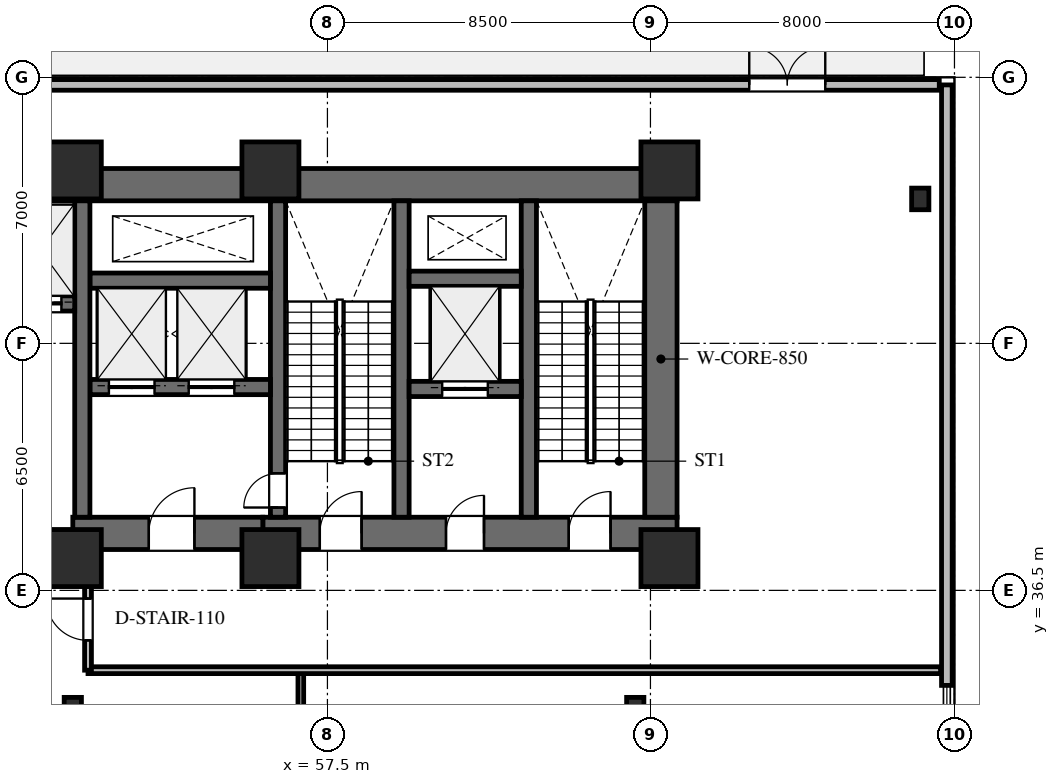
"""IFC4 building model, lengths in metres.
Left out: names, types, materials, properties, quantities, classifications, styles, units other than length and angle.
Written with IfcOpenShell. Run it as: python <this file> out.ifc"""

import sys

from ifc_helpers import new_model, si_unit, direction, frame, frame_2d, origin, origin_2d, place, context, subcontext, project, spatial, rectangle, i_section, extrude, element, fill, save


model = new_model("IFC4")
c1 = context("Model", 3, precision=1e-05, world=origin(), true_north=direction((0.0, 1.0)))
c2 = subcontext(c1, "Body", "Model", "MODEL_VIEW")
j1 = project(units=[si_unit("LENGTHUNIT", "METRE"), si_unit("PLANEANGLEUNIT", "RADIAN")], contexts=[c1])
p1 = place(None, origin())
s1 = spatial("IfcSite", under=j1, at=p1, CompositionType="ELEMENT")
p2 = place(p1, origin())
s2 = spatial("IfcBuilding", under=s1, at=p2, CompositionType="ELEMENT")
p3 = place(p2, origin())
s3 = spatial("IfcBuildingStorey", under=s2, at=p3, CompositionType="ELEMENT", Elevation=0.0)
p4 = place(p3, frame((22.9, 47.175, 0.0), z_axis=(0.0, 0.0, 1.0), x_axis=(1.0, 0.0, 0.0)))
e1 = element("IfcWall", 1, at=p4, inside=s3, PredefinedType="SHEAR", context=c2, shape_type="SweptSolid", body=[
    extrude(rectangle(XDim=43.8, YDim=0.85, at=frame_2d((21.9, 0.0))), origin(), (0.0, 0.0, 1.0), 5.4),
])
p5 = place(p3, frame((55.8, 38.0, 0.0), z_axis=(0.0, 0.0, 1.0), x_axis=(1.0, 0.0, 0.0)))
e2 = element("IfcWall", 2, at=p5, inside=s3, PredefinedType="SHEAR", context=c2, shape_type="SweptSolid", body=[
    extrude(rectangle(XDim=10.9, YDim=0.85, at=frame_2d((5.45, 0.0))), origin(), (0.0, 0.0, 1.0), 5.4),
])
p6 = place(p5, frame((1.5, 0.0, 0.0)))
e3 = element("IfcOpeningElement", 3, at=p6, cuts=e2, PredefinedType="OPENING", context=c2, shape_type="SweptSolid", body=[
    extrude(rectangle(XDim=1.1, YDim=2.2, at=frame_2d((0.55, 1.1))), frame((0.0, 0.435, 0.0), z_axis=(0.0, -1.0, 0.0), x_axis=(1.0, 0.0, 0.0)), (0.0, 0.0, 1.0), 0.87),
])
p7 = place(p5, frame((4.82, 0.0, 0.0)))
e4 = element("IfcOpeningElement", 4, at=p7, cuts=e2, PredefinedType="OPENING", context=c2, shape_type="SweptSolid", body=[
    extrude(rectangle(XDim=1.0, YDim=2.15, at=frame_2d((0.5, 1.075))), frame((0.0, 0.435, 0.0), z_axis=(0.0, -1.0, 0.0), x_axis=(1.0, 0.0, 0.0)), (0.0, 0.0, 1.0), 0.87),
])
p8 = place(p5, frame((8.05, 0.0, 0.0)))
e5 = element("IfcOpeningElement", 5, at=p8, cuts=e2, PredefinedType="OPENING", context=c2, shape_type="SweptSolid", body=[
    extrude(rectangle(XDim=1.1, YDim=2.2, at=frame_2d((0.55, 1.1))), frame((0.0, 0.435, 0.0), z_axis=(0.0, -1.0, 0.0), x_axis=(1.0, 0.0, 0.0)), (0.0, 0.0, 1.0), 0.87),
])
p9 = place(p3, frame((66.275, 38.425, 0.0), z_axis=(0.0, 0.0, 1.0), x_axis=(0.0, 1.0, 0.0)))
e6 = element("IfcWall", 6, at=p9, inside=s3, PredefinedType="SHEAR", context=c2, shape_type="SweptSolid", body=[
    extrude(rectangle(XDim=8.325, YDim=0.85, at=frame_2d((4.163, 0.0))), origin(), (0.0, 0.0, 1.0), 5.4),
])
for number, where, z_axis, x_axis in (
    (7, (62.8, 38.425, 0.0), (0.0, 0.0, 1.0), (0.0, 1.0, 0.0)),
    (8, (59.45, 38.425, 0.0), (0.0, 0.0, 1.0), (0.0, 1.0, 0.0)),
):
    element("IfcWall", number, at=place(p3, frame(where, z_axis=z_axis, x_axis=x_axis)), inside=s3, PredefinedType="SHEAR", context=c2, shape_type="SweptSolid", body=[
        extrude(rectangle(XDim=8.325, YDim=0.4, at=frame_2d((4.163, 0.0))), origin(), (0.0, 0.0, 1.0), 5.4),
    ])
p10 = place(p3, frame((56.2, 38.425, 0.0), z_axis=(0.0, 0.0, 1.0), x_axis=(0.0, 1.0, 0.0)))
e9 = element("IfcWall", 9, at=p10, inside=s3, PredefinedType="SHEAR", context=c2, shape_type="SweptSolid", body=[
    extrude(rectangle(XDim=8.325, YDim=0.4, at=frame_2d((4.163, 0.0))), origin(), (0.0, 0.0, 1.0), 5.4),
])
p11 = place(p10, frame((0.255, 0.0, 0.0)))
e10 = element("IfcOpeningElement", 10, at=p11, cuts=e9, PredefinedType="OPENING", context=c2, shape_type="SweptSolid", body=[
    extrude(rectangle(XDim=0.9, YDim=2.15, at=frame_2d((0.45, 1.075))), frame((0.0, 0.21, 0.0), z_axis=(0.0, -1.0, 0.0), x_axis=(1.0, 0.0, 0.0)), (0.0, 0.0, 1.0), 0.42),
])
p12 = place(p3, frame((59.65, 41.8, 0.0), z_axis=(0.0, 0.0, 1.0), x_axis=(1.0, 0.0, 0.0)))
e11 = element("IfcWall", 11, at=p12, inside=s3, PredefinedType="SHEAR", context=c2, shape_type="SweptSolid", body=[
    extrude(rectangle(XDim=2.95, YDim=0.4, at=frame_2d((1.475, 0.0))), origin(), (0.0, 0.0, 1.0), 5.4),
])
p13 = place(p12, frame((0.87, 0.0, 0.0)))
e12 = element("IfcOpeningElement", 12, at=p13, cuts=e11, PredefinedType="OPENING", context=c2, shape_type="SweptSolid", body=[
    extrude(rectangle(XDim=1.2, YDim=2.2, at=frame_2d((0.6, 1.1))), frame((0.0, 0.21, 0.0), z_axis=(0.0, -1.0, 0.0), x_axis=(1.0, 0.0, 0.0)), (0.0, 0.0, 1.0), 0.42),
])
p14 = place(p3, frame((59.65, 44.7, 0.0), z_axis=(0.0, 0.0, 1.0), x_axis=(1.0, 0.0, 0.0)))
e13 = element("IfcWall", 13, at=p14, inside=s3, PredefinedType="SHEAR", context=c2, shape_type="SweptSolid", body=[
    extrude(rectangle(XDim=2.95, YDim=0.4, at=frame_2d((1.475, 0.0))), origin(), (0.0, 0.0, 1.0), 5.4),
])
p15 = place(p3, frame((50.8, 38.0, 0.0), z_axis=(0.0, 0.0, 1.0), x_axis=(1.0, 0.0, 0.0)))
e14 = element("IfcWall", 14, at=p15, inside=s3, PredefinedType="SHEAR", context=c2, shape_type="SweptSolid", body=[
    extrude(rectangle(XDim=5.0, YDim=0.85, at=frame_2d((2.5, 0.0))), origin(), (0.0, 0.0, 1.0), 5.4),
])
p16 = place(p15, frame((2.0, 0.0, 0.0)))
e15 = element("IfcOpeningElement", 15, at=p16, cuts=e14, PredefinedType="OPENING", context=c2, shape_type="SweptSolid", body=[
    extrude(rectangle(XDim=1.2, YDim=2.2, at=frame_2d((0.6, 1.1))), frame((0.0, 0.435, 0.0), z_axis=(0.0, -1.0, 0.0), x_axis=(1.0, 0.0, 0.0)), (0.0, 0.0, 1.0), 0.87),
])
p17 = place(p3, frame((51.25, 41.85, 0.0), z_axis=(0.0, 0.0, 1.0), x_axis=(1.0, 0.0, 0.0)))
e16 = element("IfcWall", 16, at=p17, inside=s3, PredefinedType="SHEAR", context=c2, shape_type="SweptSolid", body=[
    extrude(rectangle(XDim=4.75, YDim=0.4, at=frame_2d((2.375, 0.0))), origin(), (0.0, 0.0, 1.0), 5.4),
])
p18 = place(p17, frame((0.5, 0.0, 0.0)))
e17 = element("IfcOpeningElement", 17, at=p18, cuts=e16, PredefinedType="OPENING", context=c2, shape_type="SweptSolid", body=[
    extrude(rectangle(XDim=1.2, YDim=2.2, at=frame_2d((0.6, 1.1))), frame((0.0, 0.21, 0.0), z_axis=(0.0, -1.0, 0.0), x_axis=(1.0, 0.0, 0.0)), (0.0, 0.0, 1.0), 0.42),
])
p19 = place(p17, frame((2.6, 0.0, 0.0)))
e18 = element("IfcOpeningElement", 18, at=p19, cuts=e16, PredefinedType="OPENING", context=c2, shape_type="SweptSolid", body=[
    extrude(rectangle(XDim=1.2, YDim=2.2, at=frame_2d((0.6, 1.1))), frame((0.0, 0.21, 0.0), z_axis=(0.0, -1.0, 0.0), x_axis=(1.0, 0.0, 0.0)), (0.0, 0.0, 1.0), 0.42),
])
p20 = place(p3, frame((51.25, 44.65, 0.0), z_axis=(0.0, 0.0, 1.0), x_axis=(1.0, 0.0, 0.0)))
e19 = element("IfcWall", 19, at=p20, inside=s3, PredefinedType="SHEAR", context=c2, shape_type="SweptSolid", body=[
    extrude(rectangle(XDim=4.75, YDim=0.4, at=frame_2d((2.375, 0.0))), origin(), (0.0, 0.0, 1.0), 5.4),
])
p21 = place(p3, frame((51.05, 38.425, 0.0), z_axis=(0.0, 0.0, 1.0), x_axis=(0.0, 1.0, 0.0)))
e20 = element("IfcWall", 20, at=p21, inside=s3, PredefinedType="SHEAR", context=c2, shape_type="SweptSolid", body=[
    extrude(rectangle(XDim=8.325, YDim=0.4, at=frame_2d((4.163, 0.0))), origin(), (0.0, 0.0, 1.0), 5.4),
])
p22 = place(p3, frame((45.25, 44.05, 0.0), z_axis=(0.0, 0.0, 1.0), x_axis=(1.0, 0.0, 0.0)))
e21 = element("IfcWall", 21, at=p22, inside=s3, PredefinedType="SHEAR", context=c2, shape_type="SweptSolid", body=[
    extrude(rectangle(XDim=5.6, YDim=0.4, at=frame_2d((2.8, 0.0))), origin(), (0.0, 0.0, 1.0), 5.4),
])
p23 = place(p22, frame((0.35, 0.0, 0.0)))
e22 = element("IfcOpeningElement", 22, at=p23, cuts=e21, PredefinedType="OPENING", context=c2, shape_type="SweptSolid", body=[
    extrude(rectangle(XDim=1.1, YDim=2.2, at=frame_2d((0.55, 1.1))), frame((0.0, 0.21, 0.0), z_axis=(0.0, -1.0, 0.0), x_axis=(1.0, 0.0, 0.0)), (0.0, 0.0, 1.0), 0.42),
])
p24 = place(p22, frame((2.25, 0.0, 0.0)))
e23 = element("IfcOpeningElement", 23, at=p24, cuts=e21, PredefinedType="OPENING", context=c2, shape_type="SweptSolid", body=[
    extrude(rectangle(XDim=1.1, YDim=2.2, at=frame_2d((0.55, 1.1))), frame((0.0, 0.21, 0.0), z_axis=(0.0, -1.0, 0.0), x_axis=(1.0, 0.0, 0.0)), (0.0, 0.0, 1.0), 0.42),
])
p25 = place(p22, frame((4.15, 0.0, 0.0)))
e24 = element("IfcOpeningElement", 24, at=p25, cuts=e21, PredefinedType="OPENING", context=c2, shape_type="SweptSolid", body=[
    extrude(rectangle(XDim=1.1, YDim=2.2, at=frame_2d((0.55, 1.1))), frame((0.0, 0.21, 0.0), z_axis=(0.0, -1.0, 0.0), x_axis=(1.0, 0.0, 0.0)), (0.0, 0.0, 1.0), 0.42),
])
for number, where, z_axis, x_axis in (
    (25, (73.1, 46.8, 0.0), (0.0, 0.0, 1.0), (1.0, 0.0, 0.0)),
    (26, (50.8, 33.4, 0.0), (0.0, 0.0, 1.0), (1.0, 0.0, 0.0)),
    (27, (65.6, 33.4, 0.0), (0.0, 0.0, 1.0), (1.0, 0.0, 0.0)),
):
    element("IfcColumn", number, at=place(p3, frame(where, z_axis=z_axis, x_axis=x_axis)), inside=s3, PredefinedType="COLUMN", context=c2, shape_type="SweptSolid", body=[
        extrude(i_section(OverallWidth=0.454, OverallDepth=0.569, WebThickness=0.078, FlangeThickness=0.125, FilletRadius=0.03, at=origin_2d()), origin(), (0.0, 0.0, 1.0), 5.4),
    ])
for number, where, z_axis, x_axis in (
    (28, (66.5, 47.55, 0.0), (0.0, 0.0, 1.0), (1.0, 0.0, 0.0)),
    (29, (56.0, 47.55, 0.0), (0.0, 0.0, 1.0), (1.0, 0.0, 0.0)),
    (30, (66.5, 37.35, 0.0), (0.0, 0.0, 1.0), (1.0, 0.0, 0.0)),
    (31, (56.0, 37.35, 0.0), (0.0, 0.0, 1.0), (1.0, 0.0, 0.0)),
    (32, (50.8, 47.55, 0.0), (0.0, 0.0, 1.0), (1.0, 0.0, 0.0)),
    (33, (50.8, 37.35, 0.0), (0.0, 0.0, 1.0), (1.0, 0.0, 0.0)),
):
    element("IfcColumn", number, at=place(p3, frame(where, z_axis=z_axis, x_axis=x_axis)), inside=s3, PredefinedType="COLUMN", context=c2, shape_type="SweptSolid", body=[
        extrude(rectangle(XDim=1.5, YDim=1.5, at=origin_2d()), origin(), (0.0, 0.0, 1.0), 5.4),
    ])
p26 = place(p3, frame((0.4, 49.8, 0.0), z_axis=(0.0, 0.0, 1.0), x_axis=(1.0, 0.0, 0.0)))
e34 = element("IfcWall", 34, at=p26, inside=s3, PredefinedType="STANDARD", context=c2, shape_type="SweptSolid", body=[
    extrude(rectangle(XDim=73.2, YDim=0.28, at=frame_2d((36.6, 0.0))), origin(), (0.0, 0.0, 1.0), 5.13),
])
p27 = place(p26, frame((20.1, 0.0, 0.0)))
e35 = element("IfcOpeningElement", 35, at=p27, cuts=e34, PredefinedType="OPENING", context=c2, shape_type="SweptSolid", body=[
    extrude(rectangle(XDim=2.0, YDim=2.4, at=frame_2d((1.0, 1.2))), frame((0.0, 0.15, 0.0), z_axis=(0.0, -1.0, 0.0), x_axis=(1.0, 0.0, 0.0)), (0.0, 0.0, 1.0), 0.3),
])
p28 = place(p26, frame((68.2, 0.0, 0.0)))
e36 = element("IfcOpeningElement", 36, at=p28, cuts=e34, PredefinedType="OPENING", context=c2, shape_type="SweptSolid", body=[
    extrude(rectangle(XDim=2.0, YDim=2.4, at=frame_2d((1.0, 1.2))), frame((0.0, 0.15, 0.0), z_axis=(0.0, -1.0, 0.0), x_axis=(1.0, 0.0, 0.0)), (0.0, 0.0, 1.0), 0.3),
])
p29 = place(p26, frame((3.5, 0.0, 0.0)))
e37 = element("IfcOpeningElement", 37, at=p29, cuts=e34, PredefinedType="OPENING", context=c2, shape_type="SweptSolid", body=[
    extrude(rectangle(XDim=2.4, YDim=2.4, at=frame_2d((1.2, 1.2))), frame((0.0, 0.15, 0.0), z_axis=(0.0, -1.0, 0.0), x_axis=(1.0, 0.0, 0.0)), (0.0, 0.0, 1.0), 0.3),
])
p30 = place(p3, frame((73.8, 34.0, 0.0), z_axis=(0.0, 0.0, 1.0), x_axis=(0.0, 1.0, 0.0)))
e38 = element("IfcWall", 38, at=p30, inside=s3, PredefinedType="STANDARD", context=c2, shape_type="SweptSolid", body=[
    extrude(rectangle(XDim=15.8, YDim=0.28, at=frame_2d((7.9, 0.0))), origin(), (0.0, 0.0, 1.0), 5.13),
])
p31 = place(p3, frame((45.05, 38.0, 0.0), z_axis=(0.0, 0.0, 1.0), x_axis=(1.0, 0.0, 0.0)))
e39 = element("IfcWall", 39, at=p31, inside=s3, PredefinedType="STANDARD", context=c2, shape_type="SweptSolid", body=[
    extrude(rectangle(XDim=5.75, YDim=0.18, at=frame_2d((2.875, 0.0))), origin(), (0.0, 0.0, 1.0), 4.182),
])
p32 = place(p31, frame((1.908, 0.0, 0.0)))
e40 = element("IfcOpeningElement", 40, at=p32, cuts=e39, PredefinedType="OPENING", context=c2, shape_type="SweptSolid", body=[
    extrude(rectangle(XDim=1.8, YDim=2.2, at=frame_2d((0.9, 1.1))), frame((0.0, 0.1, 0.0), z_axis=(0.0, -1.0, 0.0), x_axis=(1.0, 0.0, 0.0)), (0.0, 0.0, 1.0), 0.2),
])
p33 = place(p3, frame((56.8, 0.365, 0.0), z_axis=(0.0, 0.0, 1.0), x_axis=(0.0, 1.0, 0.0)))
e41 = element("IfcWall", 41, at=p33, inside=s3, PredefinedType="PARTITIONING", context=c2, shape_type="SweptSolid", body=[
    extrude(rectangle(XDim=33.967, YDim=0.15, at=frame_2d((16.983, 0.0))), origin(), (0.0, 0.0, 1.0), 4.182),
])
p34 = place(p33, frame((8.435, 0.0, 0.0)))
e42 = element("IfcOpeningElement", 42, at=p34, cuts=e41, PredefinedType="OPENING", context=c2, shape_type="SweptSolid", body=[
    extrude(rectangle(XDim=1.1, YDim=2.2, at=frame_2d((0.55, 1.1))), frame((0.0, 0.085, 0.0), z_axis=(0.0, -1.0, 0.0), x_axis=(1.0, 0.0, 0.0)), (0.0, 0.0, 1.0), 0.17),
])
p35 = place(p33, frame((19.485, 0.0, 0.0)))
e43 = element("IfcOpeningElement", 43, at=p35, cuts=e41, PredefinedType="OPENING", context=c2, shape_type="SweptSolid", body=[
    extrude(rectangle(XDim=1.8, YDim=2.2, at=frame_2d((0.9, 1.1))), frame((0.0, 0.085, 0.0), z_axis=(0.0, -1.0, 0.0), x_axis=(1.0, 0.0, 0.0)), (0.0, 0.0, 1.0), 0.17),
])
p36 = place(p33, frame((29.516, 0.0, 0.0)))
e44 = element("IfcOpeningElement", 44, at=p36, cuts=e41, PredefinedType="OPENING", context=c2, shape_type="SweptSolid", body=[
    extrude(rectangle(XDim=1.05, YDim=2.2, at=frame_2d((0.525, 1.1))), frame((0.0, 0.085, 0.0), z_axis=(0.0, -1.0, 0.0), x_axis=(1.0, 0.0, 0.0)), (0.0, 0.0, 1.0), 0.17),
])
p37 = place(p3, frame((51.2, 34.4, 0.0), z_axis=(0.0, 0.0, 1.0), x_axis=(1.0, 0.0, 0.0)))
e45 = element("IfcWall", 45, at=p37, inside=s3, PredefinedType="STANDARD", context=c2, shape_type="SweptSolid", body=[
    extrude(rectangle(XDim=22.435, YDim=0.18, at=frame_2d((11.218, 0.0))), origin(), (0.0, 0.0, 1.0), 4.182),
])
p38 = place(p3, frame((51.2, 34.4, 0.0), z_axis=(0.0, 0.0, 1.0), x_axis=(0.0, 1.0, 0.0)))
e46 = element("IfcWall", 46, at=p38, inside=s3, PredefinedType="STANDARD", context=c2, shape_type="SweptSolid", body=[
    extrude(rectangle(XDim=3.167, YDim=0.18, at=frame_2d((1.583, 0.0))), origin(), (0.0, 0.0, 1.0), 4.823),
])
p39 = place(p38, frame((0.785, 0.0, 0.0)))
e47 = element("IfcOpeningElement", 47, at=p39, cuts=e46, PredefinedType="OPENING", context=c2, shape_type="SweptSolid", body=[
    extrude(rectangle(XDim=1.1, YDim=2.2, at=frame_2d((0.55, 1.1))), frame((0.0, 0.1, 0.0), z_axis=(0.0, -1.0, 0.0), x_axis=(1.0, 0.0, 0.0)), (0.0, 0.0, 1.0), 0.2),
])
p40 = place(p28, origin())
e48 = element("IfcDoor", 48, at=p40, inside=s3, OperationType="DOUBLE_DOOR_SINGLE_SWING", PredefinedType="DOOR", context=c2, shape_type="SweptSolid", body=[
    extrude(rectangle(XDim=2.0, YDim=2.4, at=frame_2d((1.0, 1.2))), frame((0.0, 0.025, 0.0), z_axis=(0.0, -1.0, 0.0), x_axis=(1.0, 0.0, 0.0)), (0.0, 0.0, 1.0), 0.05),
])
fill(e36, e48)
p41 = place(p6, origin())
e49 = element("IfcDoor", 49, at=p41, inside=s3, OperationType="SINGLE_SWING_RIGHT", PredefinedType="DOOR", context=c2, shape_type="SweptSolid", body=[
    extrude(rectangle(XDim=1.1, YDim=2.2, at=frame_2d((0.55, 1.1))), frame((0.0, 0.025, 0.0), z_axis=(0.0, -1.0, 0.0), x_axis=(1.0, 0.0, 0.0)), (0.0, 0.0, 1.0), 0.05),
])
fill(e3, e49)
p42 = place(p7, origin())
e50 = element("IfcDoor", 50, at=p42, inside=s3, OperationType="SINGLE_SWING_RIGHT", PredefinedType="DOOR", context=c2, shape_type="SweptSolid", body=[
    extrude(rectangle(XDim=1.0, YDim=2.15, at=frame_2d((0.5, 1.075))), frame((0.0, 0.025, 0.0), z_axis=(0.0, -1.0, 0.0), x_axis=(1.0, 0.0, 0.0)), (0.0, 0.0, 1.0), 0.05),
])
fill(e4, e50)
p43 = place(p8, origin())
e51 = element("IfcDoor", 51, at=p43, inside=s3, OperationType="SINGLE_SWING_RIGHT", PredefinedType="DOOR", context=c2, shape_type="SweptSolid", body=[
    extrude(rectangle(XDim=1.1, YDim=2.2, at=frame_2d((0.55, 1.1))), frame((0.0, 0.025, 0.0), z_axis=(0.0, -1.0, 0.0), x_axis=(1.0, 0.0, 0.0)), (0.0, 0.0, 1.0), 0.05),
])
fill(e5, e51)
p44 = place(p16, origin())
e52 = element("IfcDoor", 52, at=p44, inside=s3, OperationType="SINGLE_SWING_RIGHT", PredefinedType="DOOR", context=c2, shape_type="SweptSolid", body=[
    extrude(rectangle(XDim=1.2, YDim=2.2, at=frame_2d((0.6, 1.1))), frame((0.0, 0.025, 0.0), z_axis=(0.0, -1.0, 0.0), x_axis=(1.0, 0.0, 0.0)), (0.0, 0.0, 1.0), 0.05),
])
fill(e15, e52)
p45 = place(p11, origin())
e53 = element("IfcDoor", 53, at=p45, inside=s3, OperationType="SINGLE_SWING_LEFT", PredefinedType="DOOR", context=c2, shape_type="SweptSolid", body=[
    extrude(rectangle(XDim=0.9, YDim=2.15, at=frame_2d((0.45, 1.075))), frame((0.0, 0.025, 0.0), z_axis=(0.0, -1.0, 0.0), x_axis=(1.0, 0.0, 0.0)), (0.0, 0.0, 1.0), 0.05),
])
fill(e10, e53)
p46 = place(p25, origin())
e54 = element("IfcDoor", 54, at=p46, inside=s3, OperationType="DOUBLE_DOOR_SLIDING", PredefinedType="DOOR", context=c2, shape_type="SweptSolid", body=[
    extrude(rectangle(XDim=1.1, YDim=2.2, at=frame_2d((0.55, 1.1))), frame((0.0, 0.025, 0.0), z_axis=(0.0, -1.0, 0.0), x_axis=(1.0, 0.0, 0.0)), (0.0, 0.0, 1.0), 0.05),
])
fill(e24, e54)
p47 = place(p18, origin())
e55 = element("IfcDoor", 55, at=p47, inside=s3, OperationType="DOUBLE_DOOR_SLIDING", PredefinedType="DOOR", context=c2, shape_type="SweptSolid", body=[
    extrude(rectangle(XDim=1.2, YDim=2.2, at=frame_2d((0.6, 1.1))), frame((0.0, 0.025, 0.0), z_axis=(0.0, -1.0, 0.0), x_axis=(1.0, 0.0, 0.0)), (0.0, 0.0, 1.0), 0.05),
])
fill(e17, e55)
p48 = place(p19, origin())
e56 = element("IfcDoor", 56, at=p48, inside=s3, OperationType="DOUBLE_DOOR_SLIDING", PredefinedType="DOOR", context=c2, shape_type="SweptSolid", body=[
    extrude(rectangle(XDim=1.2, YDim=2.2, at=frame_2d((0.6, 1.1))), frame((0.0, 0.025, 0.0), z_axis=(0.0, -1.0, 0.0), x_axis=(1.0, 0.0, 0.0)), (0.0, 0.0, 1.0), 0.05),
])
fill(e18, e56)
p49 = place(p13, origin())
e57 = element("IfcDoor", 57, at=p49, inside=s3, OperationType="DOUBLE_DOOR_SLIDING", PredefinedType="DOOR", context=c2, shape_type="SweptSolid", body=[
    extrude(rectangle(XDim=1.2, YDim=2.2, at=frame_2d((0.6, 1.1))), frame((0.0, 0.025, 0.0), z_axis=(0.0, -1.0, 0.0), x_axis=(1.0, 0.0, 0.0)), (0.0, 0.0, 1.0), 0.05),
])
fill(e12, e57)
p50 = place(p39, origin())
e58 = element("IfcDoor", 58, at=p50, inside=s3, OperationType="SINGLE_SWING_RIGHT", PredefinedType="DOOR", context=c2, shape_type="SweptSolid", body=[
    extrude(rectangle(XDim=1.1, YDim=2.2, at=frame_2d((0.55, 1.1))), frame((0.0, 0.025, 0.0), z_axis=(0.0, -1.0, 0.0), x_axis=(1.0, 0.0, 0.0)), (0.0, 0.0, 1.0), 0.05),
])
fill(e47, e58)
save(model, sys.argv[1])
